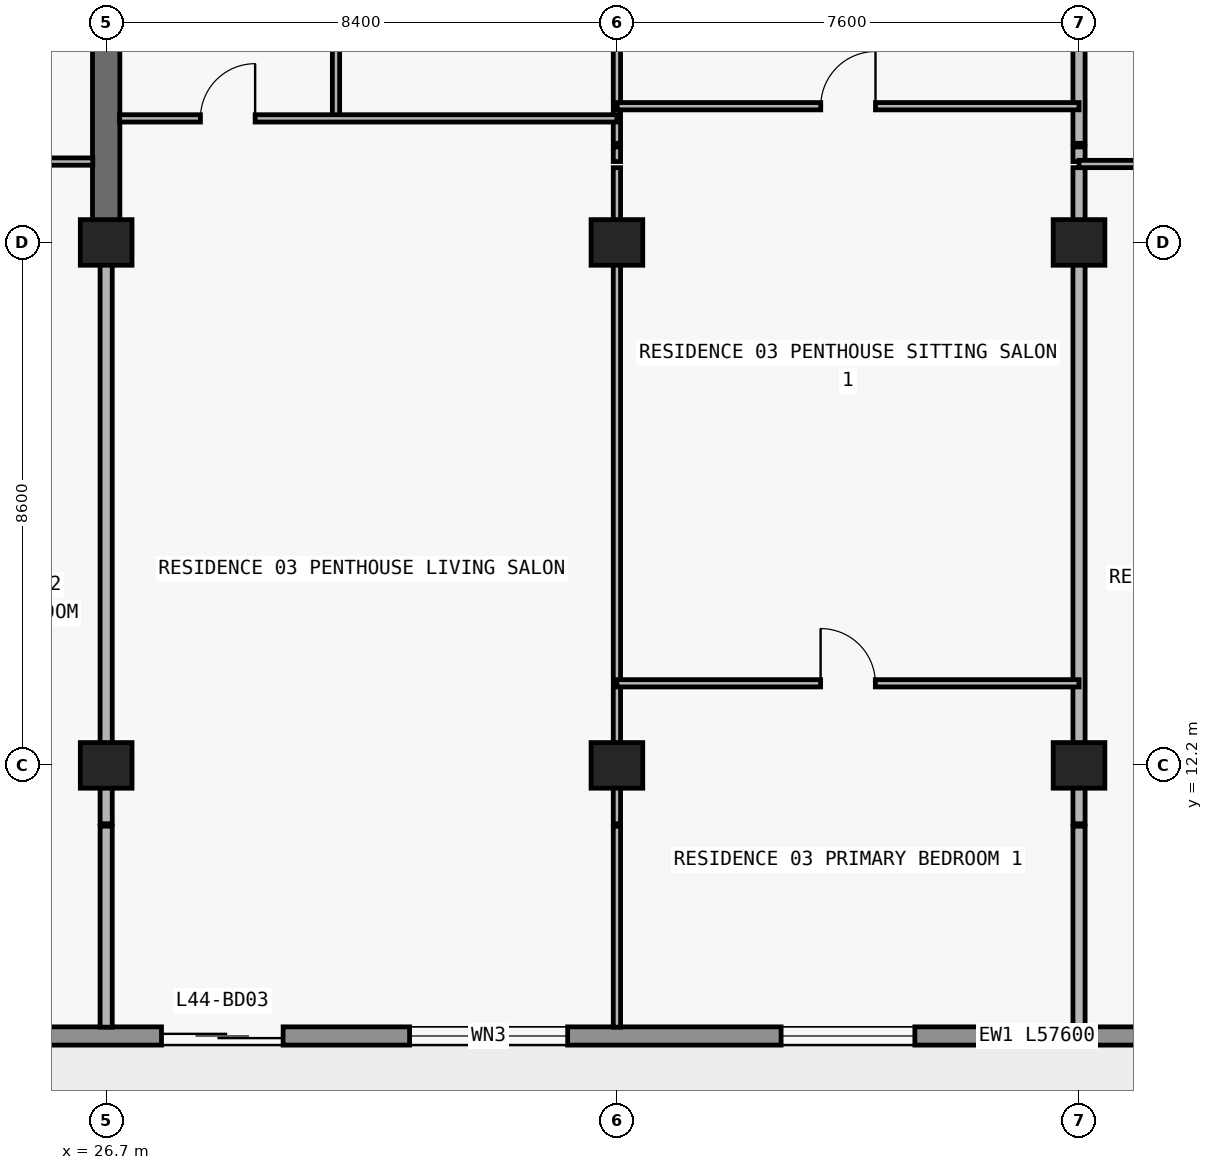
"""IFC4 building model, lengths in metres.
Left out: names, types, materials, properties, quantities, classifications, styles, units other than length and angle.
Written with IfcOpenShell. Run it as: python <this file> out.ifc"""

import sys

from ifc_helpers import new_model, si_unit, direction, frame, frame_2d, origin, origin_2d, place, context, subcontext, project, spatial, rectangle, extrude, element, fill, save


model = new_model("IFC4")
c1 = context("Model", 3, precision=1e-05, world=origin(), true_north=direction((0.0, 1.0)))
c2 = subcontext(c1, "Body", "Model", "MODEL_VIEW")
j1 = project(units=[si_unit("LENGTHUNIT", "METRE"), si_unit("PLANEANGLEUNIT", "RADIAN")], contexts=[c1])
p1 = place(None, origin())
s1 = spatial("IfcSite", under=j1, at=p1, CompositionType="ELEMENT")
p2 = place(p1, origin())
s2 = spatial("IfcBuilding", under=s1, at=p2, CompositionType="ELEMENT")
p3 = place(p2, frame((0.0, 0.0, 160.5)))
s3 = spatial("IfcBuildingStorey", under=s2, at=p3, CompositionType="ELEMENT", Elevation=160.5)
for number, where, z_axis, x_axis in (
    (1, (26.7, 12.2, 0.0), (0.0, 0.0, 1.0), (1.0, 0.0, 0.0)),
    (2, (35.1, 12.2, 0.0), (0.0, 0.0, 1.0), (1.0, 0.0, 0.0)),
    (3, (42.7, 12.2, 0.0), (0.0, 0.0, 1.0), (1.0, 0.0, 0.0)),
    (4, (26.7, 20.8, 0.0), (0.0, 0.0, 1.0), (1.0, 0.0, 0.0)),
    (5, (35.1, 20.8, 0.0), (0.0, 0.0, 1.0), (1.0, 0.0, 0.0)),
    (6, (42.7, 20.8, 0.0), (0.0, 0.0, 1.0), (1.0, 0.0, 0.0)),
):
    element("IfcColumn", number, at=place(p3, frame(where, z_axis=z_axis, x_axis=x_axis)), inside=s3, PredefinedType="COLUMN", context=c2, shape_type="SweptSolid", body=[
        extrude(rectangle(XDim=0.85, YDim=0.75, at=origin_2d()), origin(), (0.0, 0.0, 1.0), 3.05),
    ])
p4 = place(p3, frame((26.7, 20.8, 0.0), z_axis=(0.0, 0.0, 1.0), x_axis=(0.0, 1.0, 0.0)))
e7 = element("IfcWall", 7, at=p4, inside=s3, PredefinedType="SHEAR", context=c2, shape_type="SweptSolid", body=[
    extrude(rectangle(XDim=8.6, YDim=0.45, at=frame_2d((4.3, 0.0))), origin(), (0.0, 0.0, 1.0), 3.05),
])
p5 = place(p3, frame((67.7, 7.75, 0.0), z_axis=(0.0, 0.0, 1.0), x_axis=(-1.0, 0.0, 0.0)))
e8 = element("IfcWall", 8, at=p5, inside=s3, PredefinedType="STANDARD", context=c2, shape_type="SweptSolid", body=[
    extrude(rectangle(XDim=57.6, YDim=0.3, at=frame_2d((28.8, 0.0))), origin(), (0.0, 0.0, 1.0), 3.05),
])
p6 = place(p5, frame((54.673, 0.0, 0.0)))
e9 = element("IfcOpeningElement", 9, at=p6, cuts=e8, PredefinedType="OPENING", context=c2, shape_type="SweptSolid", body=[
    extrude(rectangle(XDim=2.0, YDim=2.3, at=frame_2d((1.0, 1.15))), frame((0.0, 0.16, 0.0), z_axis=(0.0, -1.0, 0.0), x_axis=(1.0, 0.0, 0.0)), (0.0, 0.0, 1.0), 0.32),
])
p7 = place(p5, frame((50.473, 0.0, 0.85)))
e10 = element("IfcOpeningElement", 10, at=p7, cuts=e8, PredefinedType="OPENING", context=c2, shape_type="SweptSolid", body=[
    extrude(rectangle(XDim=2.2, YDim=1.55, at=frame_2d((1.1, 0.775))), frame((0.0, 0.16, 0.0), z_axis=(0.0, -1.0, 0.0), x_axis=(1.0, 0.0, 0.0)), (0.0, 0.0, 1.0), 0.32),
])
p8 = place(p5, frame((46.09, 0.0, 0.0)))
e11 = element("IfcOpeningElement", 11, at=p8, cuts=e8, PredefinedType="OPENING", context=c2, shape_type="SweptSolid", body=[
    extrude(rectangle(XDim=2.0, YDim=2.3, at=frame_2d((1.0, 1.15))), frame((0.0, 0.16, 0.0), z_axis=(0.0, -1.0, 0.0), x_axis=(1.0, 0.0, 0.0)), (0.0, 0.0, 1.0), 0.32),
])
p9 = place(p5, frame((41.99, 0.0, 0.85)))
e12 = element("IfcOpeningElement", 12, at=p9, cuts=e8, PredefinedType="OPENING", context=c2, shape_type="SweptSolid", body=[
    extrude(rectangle(XDim=1.8, YDim=1.55, at=frame_2d((0.9, 0.775))), frame((0.0, 0.16, 0.0), z_axis=(0.0, -1.0, 0.0), x_axis=(1.0, 0.0, 0.0)), (0.0, 0.0, 1.0), 0.32),
])
p10 = place(p5, frame((38.09, 0.0, 0.0)))
e13 = element("IfcOpeningElement", 13, at=p10, cuts=e8, PredefinedType="OPENING", context=c2, shape_type="SweptSolid", body=[
    extrude(rectangle(XDim=2.0, YDim=2.3, at=frame_2d((1.0, 1.15))), frame((0.0, 0.16, 0.0), z_axis=(0.0, -1.0, 0.0), x_axis=(1.0, 0.0, 0.0)), (0.0, 0.0, 1.0), 0.32),
])
p11 = place(p5, frame((33.41, 0.0, 0.65)))
e14 = element("IfcOpeningElement", 14, at=p11, cuts=e8, PredefinedType="OPENING", context=c2, shape_type="SweptSolid", body=[
    extrude(rectangle(XDim=2.6, YDim=1.85, at=frame_2d((1.3, 0.925))), frame((0.0, 0.16, 0.0), z_axis=(0.0, -1.0, 0.0), x_axis=(1.0, 0.0, 0.0)), (0.0, 0.0, 1.0), 0.32),
])
p12 = place(p5, frame((27.7, 0.0, 0.85)))
e15 = element("IfcOpeningElement", 15, at=p12, cuts=e8, PredefinedType="OPENING", context=c2, shape_type="SweptSolid", body=[
    extrude(rectangle(XDim=2.2, YDim=1.55, at=frame_2d((1.1, 0.775))), frame((0.0, 0.16, 0.0), z_axis=(0.0, -1.0, 0.0), x_axis=(1.0, 0.0, 0.0)), (0.0, 0.0, 1.0), 0.32),
])
p13 = place(p5, frame((21.69, 0.0, 0.0)))
e16 = element("IfcOpeningElement", 16, at=p13, cuts=e8, PredefinedType="OPENING", context=c2, shape_type="SweptSolid", body=[
    extrude(rectangle(XDim=2.0, YDim=2.3, at=frame_2d((1.0, 1.15))), frame((0.0, 0.16, 0.0), z_axis=(0.0, -1.0, 0.0), x_axis=(1.0, 0.0, 0.0)), (0.0, 0.0, 1.0), 0.32),
])
p14 = place(p5, frame((17.59, 0.0, 0.85)))
e17 = element("IfcOpeningElement", 17, at=p14, cuts=e8, PredefinedType="OPENING", context=c2, shape_type="SweptSolid", body=[
    extrude(rectangle(XDim=1.8, YDim=1.55, at=frame_2d((0.9, 0.775))), frame((0.0, 0.16, 0.0), z_axis=(0.0, -1.0, 0.0), x_axis=(1.0, 0.0, 0.0)), (0.0, 0.0, 1.0), 0.32),
])
p15 = place(p5, frame((13.626, 0.0, 0.0)))
e18 = element("IfcOpeningElement", 18, at=p15, cuts=e8, PredefinedType="OPENING", context=c2, shape_type="SweptSolid", body=[
    extrude(rectangle(XDim=2.0, YDim=2.3, at=frame_2d((1.0, 1.15))), frame((0.0, 0.16, 0.0), z_axis=(0.0, -1.0, 0.0), x_axis=(1.0, 0.0, 0.0)), (0.0, 0.0, 1.0), 0.32),
])
p16 = place(p5, frame((9.326, 0.0, 0.85)))
e19 = element("IfcOpeningElement", 19, at=p16, cuts=e8, PredefinedType="OPENING", context=c2, shape_type="SweptSolid", body=[
    extrude(rectangle(XDim=2.2, YDim=1.55, at=frame_2d((1.1, 0.775))), frame((0.0, 0.16, 0.0), z_axis=(0.0, -1.0, 0.0), x_axis=(1.0, 0.0, 0.0)), (0.0, 0.0, 1.0), 0.32),
])
p17 = place(p5, frame((4.945, 0.0, 0.0)))
e20 = element("IfcOpeningElement", 20, at=p17, cuts=e8, PredefinedType="OPENING", context=c2, shape_type="SweptSolid", body=[
    extrude(rectangle(XDim=2.0, YDim=2.3, at=frame_2d((1.0, 1.15))), frame((0.0, 0.16, 0.0), z_axis=(0.0, -1.0, 0.0), x_axis=(1.0, 0.0, 0.0)), (0.0, 0.0, 1.0), 0.32),
])
p18 = place(p5, frame((0.945, 0.0, 0.85)))
e21 = element("IfcOpeningElement", 21, at=p18, cuts=e8, PredefinedType="OPENING", context=c2, shape_type="SweptSolid", body=[
    extrude(rectangle(XDim=1.8, YDim=1.55, at=frame_2d((0.9, 0.775))), frame((0.0, 0.16, 0.0), z_axis=(0.0, -1.0, 0.0), x_axis=(1.0, 0.0, 0.0)), (0.0, 0.0, 1.0), 0.32),
])
p19 = place(p3, frame((26.7, 7.895, 0.0), z_axis=(0.0, 0.0, 1.0), x_axis=(0.0, 1.0, 0.0)))
e22 = element("IfcWall", 22, at=p19, inside=s3, PredefinedType="PARTITIONING", context=c2, shape_type="SweptSolid", body=[
    extrude(rectangle(XDim=3.305, YDim=0.2, at=frame_2d((1.652, 0.0))), origin(), (0.0, 0.0, 1.0), 3.05),
])
p20 = place(p3, frame((26.7, 11.24, 0.0), z_axis=(0.0, 0.0, 1.0), x_axis=(0.0, 1.0, 0.0)))
e23 = element("IfcWall", 23, at=p20, inside=s3, PredefinedType="PARTITIONING", context=c2, shape_type="SweptSolid", body=[
    extrude(rectangle(XDim=9.555, YDim=0.2, at=frame_2d((4.777, 0.0))), origin(), (0.0, 0.0, 1.0), 2.263),
])
p21 = place(p3, frame((30.48, 22.84, 0.0), z_axis=(0.0, 0.0, 1.0), x_axis=(0.0, 1.0, 0.0)))
e24 = element("IfcWall", 24, at=p21, inside=s3, PredefinedType="PARTITIONING", context=c2, shape_type="SweptSolid", body=[
    extrude(rectangle(XDim=4.34, YDim=0.12, at=frame_2d((2.17, 0.0))), origin(), (0.0, 0.0, 1.0), 3.05),
])
p22 = place(p21, frame((1.72, 0.0, 0.0)))
e25 = element("IfcOpeningElement", 25, at=p22, cuts=e24, PredefinedType="OPENING", context=c2, shape_type="SweptSolid", body=[
    extrude(rectangle(XDim=0.9, YDim=2.15, at=frame_2d((0.45, 1.075))), frame((0.0, 0.07, 0.0), z_axis=(0.0, -1.0, 0.0), x_axis=(1.0, 0.0, 0.0)), (0.0, 0.0, 1.0), 0.14),
])
p23 = place(p3, frame((35.1, 7.895, 0.0), z_axis=(0.0, 0.0, 1.0), x_axis=(0.0, 1.0, 0.0)))
e26 = element("IfcWall", 26, at=p23, inside=s3, PredefinedType="PARTITIONING", context=c2, shape_type="SweptSolid", body=[
    extrude(rectangle(XDim=3.305, YDim=0.12, at=frame_2d((1.652, 0.0))), origin(), (0.0, 0.0, 1.0), 3.05),
])
p24 = place(p3, frame((35.1, 11.24, 0.0), z_axis=(0.0, 0.0, 1.0), x_axis=(0.0, 1.0, 0.0)))
e27 = element("IfcWall", 27, at=p24, inside=s3, PredefinedType="PARTITIONING", context=c2, shape_type="SweptSolid", body=[
    extrude(rectangle(XDim=10.79, YDim=0.12, at=frame_2d((5.395, 0.0))), origin(), (0.0, 0.0, 1.0), 2.263),
])
p25 = place(p3, frame((35.1, 22.13, 0.0), z_axis=(0.0, 0.0, 1.0), x_axis=(0.0, 1.0, 0.0)))
e28 = element("IfcWall", 28, at=p25, inside=s3, PredefinedType="PARTITIONING", context=c2, shape_type="SweptSolid", body=[
    extrude(rectangle(XDim=0.24, YDim=0.12, at=frame_2d((0.12, 0.0))), origin(), (0.0, 0.0, 1.0), 2.263),
])
p26 = place(p3, frame((35.1, 22.43, 0.0), z_axis=(0.0, 0.0, 1.0), x_axis=(0.0, 1.0, 0.0)))
e29 = element("IfcWall", 29, at=p26, inside=s3, PredefinedType="PARTITIONING", context=c2, shape_type="SweptSolid", body=[
    extrude(rectangle(XDim=4.75, YDim=0.12, at=frame_2d((2.375, 0.0))), origin(), (0.0, 0.0, 1.0), 2.263),
])
p27 = place(p26, frame((2.23, 0.0, 0.0)))
e30 = element("IfcOpeningElement", 30, at=p27, cuts=e29, PredefinedType="OPENING", context=c2, shape_type="SweptSolid", body=[
    extrude(rectangle(XDim=0.9, YDim=2.15, at=frame_2d((0.45, 1.075))), frame((0.0, 0.07, 0.0), z_axis=(0.0, -1.0, 0.0), x_axis=(1.0, 0.0, 0.0)), (0.0, 0.0, 1.0), 0.14),
])
p28 = place(p3, frame((42.7, 7.895, 0.0), z_axis=(0.0, 0.0, 1.0), x_axis=(0.0, 1.0, 0.0)))
e31 = element("IfcWall", 31, at=p28, inside=s3, PredefinedType="PARTITIONING", context=c2, shape_type="SweptSolid", body=[
    extrude(rectangle(XDim=3.305, YDim=0.2, at=frame_2d((1.652, 0.0))), origin(), (0.0, 0.0, 1.0), 3.05),
])
p29 = place(p3, frame((42.7, 11.24, 0.0), z_axis=(0.0, 0.0, 1.0), x_axis=(0.0, 1.0, 0.0)))
e32 = element("IfcWall", 32, at=p29, inside=s3, PredefinedType="PARTITIONING", context=c2, shape_type="SweptSolid", body=[
    extrude(rectangle(XDim=10.79, YDim=0.2, at=frame_2d((5.395, 0.0))), origin(), (0.0, 0.0, 1.0), 2.263),
])
p30 = place(p3, frame((42.7, 22.13, 0.0), z_axis=(0.0, 0.0, 1.0), x_axis=(0.0, 1.0, 0.0)))
e33 = element("IfcWall", 33, at=p30, inside=s3, PredefinedType="PARTITIONING", context=c2, shape_type="SweptSolid", body=[
    extrude(rectangle(XDim=0.24, YDim=0.2, at=frame_2d((0.12, 0.0))), origin(), (0.0, 0.0, 1.0), 2.263),
])
p31 = place(p3, frame((42.7, 22.43, 0.0), z_axis=(0.0, 0.0, 1.0), x_axis=(0.0, 1.0, 0.0)))
e34 = element("IfcWall", 34, at=p31, inside=s3, PredefinedType="PARTITIONING", context=c2, shape_type="SweptSolid", body=[
    extrude(rectangle(XDim=4.75, YDim=0.2, at=frame_2d((2.375, 0.0))), origin(), (0.0, 0.0, 1.0), 2.263),
])
p32 = place(p3, frame((35.1, 13.55, 0.0), z_axis=(0.0, 0.0, 1.0), x_axis=(1.0, 0.0, 0.0)))
e35 = element("IfcWall", 35, at=p32, inside=s3, PredefinedType="PARTITIONING", context=c2, shape_type="SweptSolid", body=[
    extrude(rectangle(XDim=7.6, YDim=0.12, at=frame_2d((3.8, 0.0))), origin(), (0.0, 0.0, 1.0), 3.05),
])
p33 = place(p32, frame((3.35, 0.0, 0.0)))
e36 = element("IfcOpeningElement", 36, at=p33, cuts=e35, PredefinedType="OPENING", context=c2, shape_type="SweptSolid", body=[
    extrude(rectangle(XDim=0.9, YDim=2.15, at=frame_2d((0.45, 1.075))), frame((0.0, 0.07, 0.0), z_axis=(0.0, -1.0, 0.0), x_axis=(1.0, 0.0, 0.0)), (0.0, 0.0, 1.0), 0.14),
])
p34 = place(p3, frame((42.7, 22.09, 0.0), z_axis=(0.0, 0.0, 1.0), x_axis=(1.0, 0.0, 0.0)))
e37 = element("IfcWall", 37, at=p34, inside=s3, PredefinedType="PARTITIONING", context=c2, shape_type="SweptSolid", body=[
    extrude(rectangle(XDim=8.18, YDim=0.12, at=frame_2d((4.09, 0.0))), origin(), (0.0, 0.0, 1.0), 3.05),
])
p35 = place(p34, frame((1.818, 0.0, 0.0)))
e38 = element("IfcOpeningElement", 38, at=p35, cuts=e37, PredefinedType="OPENING", context=c2, shape_type="SweptSolid", body=[
    extrude(rectangle(XDim=0.9, YDim=2.15, at=frame_2d((0.45, 1.075))), frame((0.0, 0.07, 0.0), z_axis=(0.0, -1.0, 0.0), x_axis=(1.0, 0.0, 0.0)), (0.0, 0.0, 1.0), 0.14),
])
p36 = place(p34, frame((5.95, 0.0, 0.0)))
e39 = element("IfcOpeningElement", 39, at=p36, cuts=e37, PredefinedType="OPENING", context=c2, shape_type="SweptSolid", body=[
    extrude(rectangle(XDim=0.9, YDim=2.15, at=frame_2d((0.45, 1.075))), frame((0.0, 0.07, 0.0), z_axis=(0.0, -1.0, 0.0), x_axis=(1.0, 0.0, 0.0)), (0.0, 0.0, 1.0), 0.14),
])
p37 = place(p3, frame((18.3, 22.13, 0.0), z_axis=(0.0, 0.0, 1.0), x_axis=(1.0, 0.0, 0.0)))
e40 = element("IfcWall", 40, at=p37, inside=s3, PredefinedType="PARTITIONING", context=c2, shape_type="SweptSolid", body=[
    extrude(rectangle(XDim=8.18, YDim=0.12, at=frame_2d((4.09, 0.0))), origin(), (0.0, 0.0, 1.0), 3.05),
])
p38 = place(p37, frame((1.86, 0.0, 0.0)))
e41 = element("IfcOpeningElement", 41, at=p38, cuts=e40, PredefinedType="OPENING", context=c2, shape_type="SweptSolid", body=[
    extrude(rectangle(XDim=0.9, YDim=2.15, at=frame_2d((0.45, 1.075))), frame((0.0, 0.07, 0.0), z_axis=(0.0, -1.0, 0.0), x_axis=(1.0, 0.0, 0.0)), (0.0, 0.0, 1.0), 0.14),
])
p39 = place(p37, frame((6.033, 0.0, 0.0)))
e42 = element("IfcOpeningElement", 42, at=p39, cuts=e40, PredefinedType="OPENING", context=c2, shape_type="SweptSolid", body=[
    extrude(rectangle(XDim=0.9, YDim=2.15, at=frame_2d((0.45, 1.075))), frame((0.0, 0.07, 0.0), z_axis=(0.0, -1.0, 0.0), x_axis=(1.0, 0.0, 0.0)), (0.0, 0.0, 1.0), 0.14),
])
p40 = place(p3, frame((26.92, 22.84, 0.0), z_axis=(0.0, 0.0, 1.0), x_axis=(1.0, 0.0, 0.0)))
e43 = element("IfcWall", 43, at=p40, inside=s3, PredefinedType="PARTITIONING", context=c2, shape_type="SweptSolid", body=[
    extrude(rectangle(XDim=8.18, YDim=0.12, at=frame_2d((4.09, 0.0))), origin(), (0.0, 0.0, 1.0), 3.05),
])
p41 = place(p40, frame((1.33, 0.0, 0.0)))
e44 = element("IfcOpeningElement", 44, at=p41, cuts=e43, PredefinedType="OPENING", context=c2, shape_type="SweptSolid", body=[
    extrude(rectangle(XDim=0.9, YDim=2.15, at=frame_2d((0.45, 1.075))), frame((0.0, 0.07, 0.0), z_axis=(0.0, -1.0, 0.0), x_axis=(1.0, 0.0, 0.0)), (0.0, 0.0, 1.0), 0.14),
])
p42 = place(p3, frame((35.105, 23.04, 0.0), z_axis=(0.0, 0.0, 1.0), x_axis=(1.0, 0.0, 0.0)))
e45 = element("IfcWall", 45, at=p42, inside=s3, PredefinedType="PARTITIONING", context=c2, shape_type="SweptSolid", body=[
    extrude(rectangle(XDim=7.595, YDim=0.12, at=frame_2d((3.797, 0.0))), origin(), (0.0, 0.0, 1.0), 3.05),
])
p43 = place(p42, frame((3.347, 0.0, 0.0)))
e46 = element("IfcOpeningElement", 46, at=p43, cuts=e45, PredefinedType="OPENING", context=c2, shape_type="SweptSolid", body=[
    extrude(rectangle(XDim=0.9, YDim=2.15, at=frame_2d((0.45, 1.075))), frame((0.0, 0.07, 0.0), z_axis=(0.0, -1.0, 0.0), x_axis=(1.0, 0.0, 0.0)), (0.0, 0.0, 1.0), 0.14),
])
p44 = place(p10, origin())
e47 = element("IfcDoor", 47, at=p44, inside=s3, OperationType="DOUBLE_DOOR_SLIDING", PredefinedType="DOOR", context=c2, shape_type="SweptSolid", body=[
    extrude(rectangle(XDim=2.0, YDim=2.3, at=frame_2d((1.0, 1.15))), frame((0.0, 0.025, 0.0), z_axis=(0.0, -1.0, 0.0), x_axis=(1.0, 0.0, 0.0)), (0.0, 0.0, 1.0), 0.05),
])
fill(e13, e47)
p45 = place(p11, origin())
e48 = element("IfcWindow", 48, at=p45, inside=s3, PartitioningType="SINGLE_PANEL", PredefinedType="WINDOW", context=c2, shape_type="SweptSolid", body=[
    extrude(rectangle(XDim=2.6, YDim=1.85, at=frame_2d((1.3, 0.925))), frame((0.0, 0.03, 0.0), z_axis=(0.0, -1.0, 0.0), x_axis=(1.0, 0.0, 0.0)), (0.0, 0.0, 1.0), 0.06),
])
fill(e14, e48)
p46 = place(p12, origin())
e49 = element("IfcWindow", 49, at=p46, inside=s3, PartitioningType="SINGLE_PANEL", PredefinedType="WINDOW", context=c2, shape_type="SweptSolid", body=[
    extrude(rectangle(XDim=2.2, YDim=1.55, at=frame_2d((1.1, 0.775))), frame((0.0, 0.03, 0.0), z_axis=(0.0, -1.0, 0.0), x_axis=(1.0, 0.0, 0.0)), (0.0, 0.0, 1.0), 0.06),
])
fill(e15, e49)
p47 = place(p41, origin())
e50 = element("IfcDoor", 50, at=p47, inside=s3, OperationType="SINGLE_SWING_RIGHT", PredefinedType="DOOR", context=c2, shape_type="SweptSolid", body=[
    extrude(rectangle(XDim=0.9, YDim=2.15, at=frame_2d((0.45, 1.075))), frame((0.0, 0.025, 0.0), z_axis=(0.0, -1.0, 0.0), x_axis=(1.0, 0.0, 0.0)), (0.0, 0.0, 1.0), 0.05),
])
fill(e44, e50)
p48 = place(p43, origin())
e51 = element("IfcDoor", 51, at=p48, inside=s3, OperationType="SINGLE_SWING_RIGHT", PredefinedType="DOOR", context=c2, shape_type="SweptSolid", body=[
    extrude(rectangle(XDim=0.9, YDim=2.15, at=frame_2d((0.45, 1.075))), frame((0.0, 0.025, 0.0), z_axis=(0.0, -1.0, 0.0), x_axis=(1.0, 0.0, 0.0)), (0.0, 0.0, 1.0), 0.05),
])
fill(e46, e51)
p49 = place(p33, origin())
e52 = element("IfcDoor", 52, at=p49, inside=s3, OperationType="SINGLE_SWING_LEFT", PredefinedType="DOOR", context=c2, shape_type="SweptSolid", body=[
    extrude(rectangle(XDim=0.9, YDim=2.15, at=frame_2d((0.45, 1.075))), frame((0.0, 0.025, 0.0), z_axis=(0.0, -1.0, 0.0), x_axis=(1.0, 0.0, 0.0)), (0.0, 0.0, 1.0), 0.05),
])
fill(e36, e52)
save(model, sys.argv[1])
